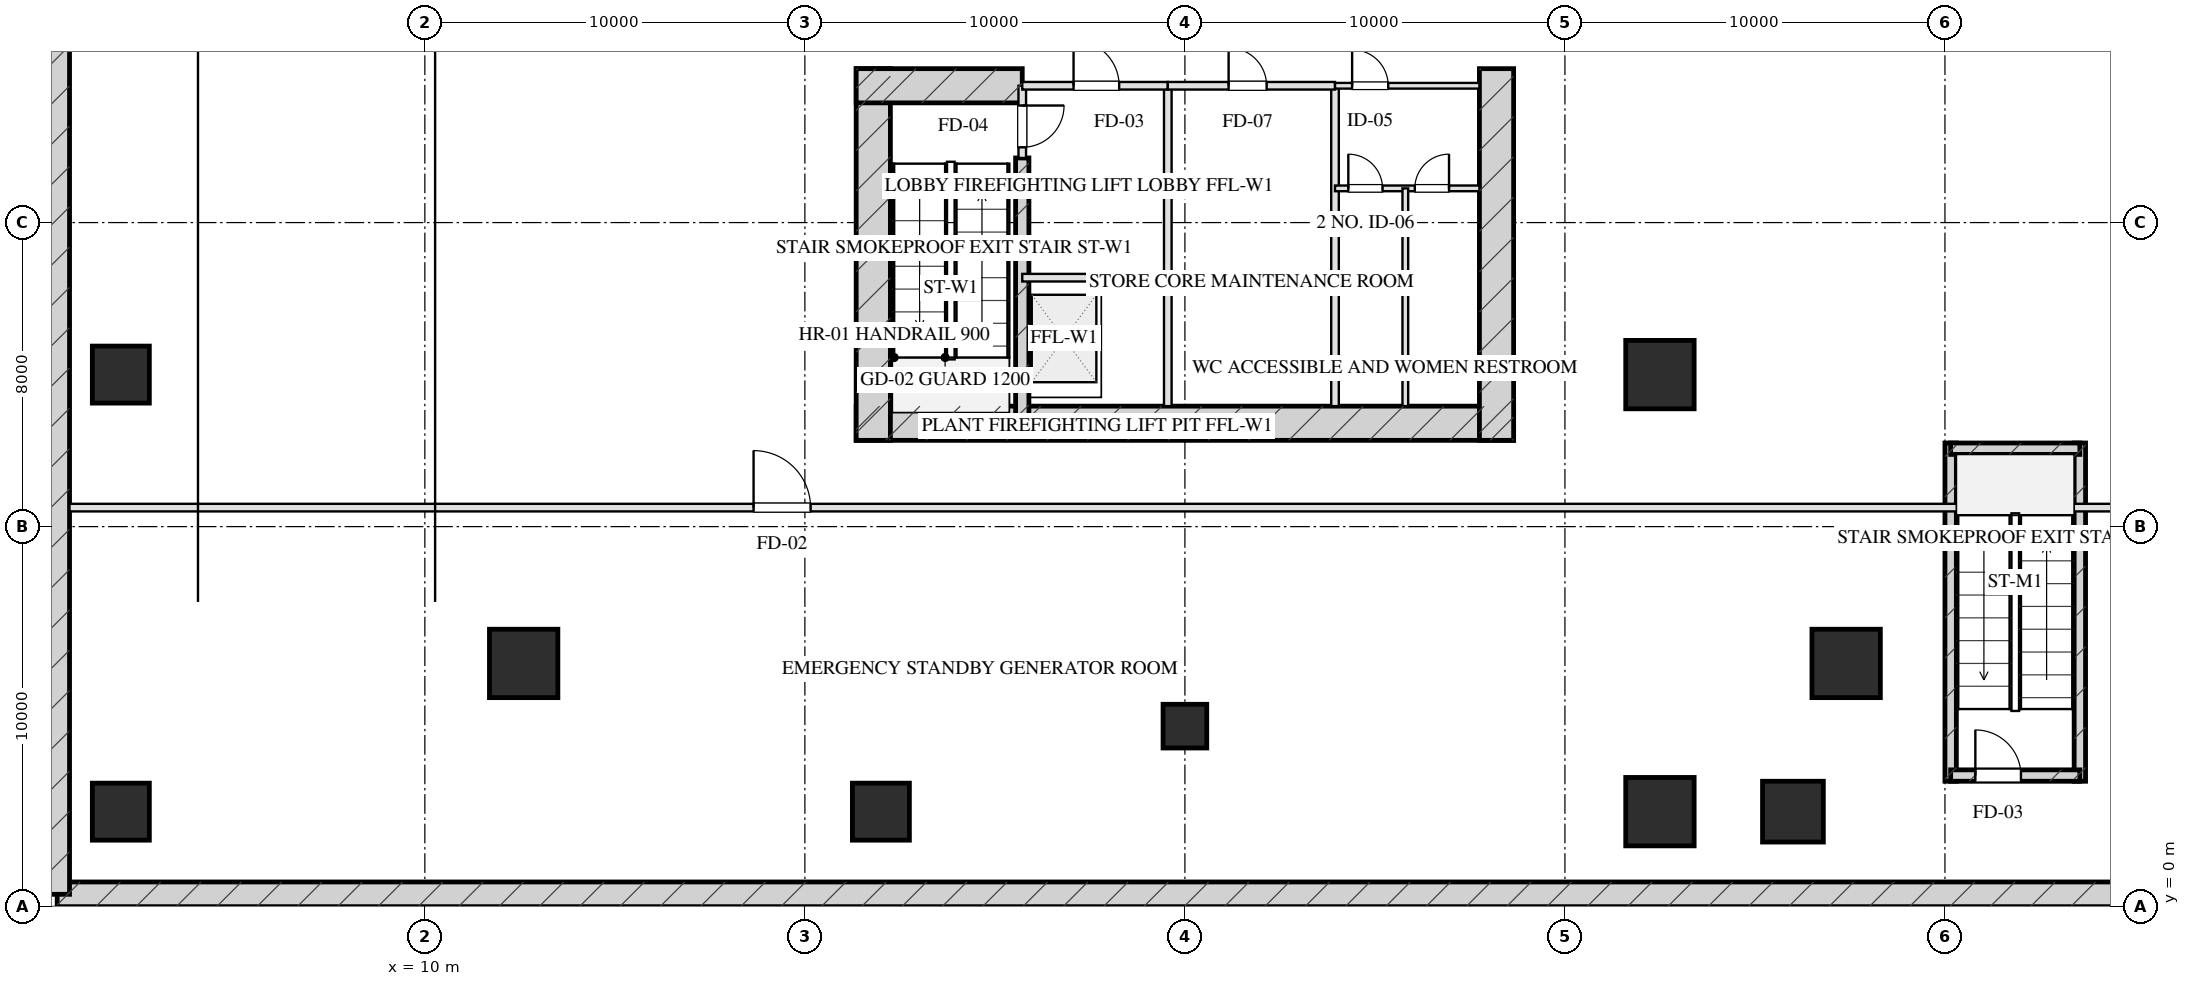
"""IFC4 building model, lengths in metres.
Left out: names, types, materials, properties, quantities, classifications, styles, units other than length and angle.
Written with IfcOpenShell. Run it as: python <this file> out.ifc"""

import sys

from ifc_helpers import new_model, si_unit, direction, frame, frame_2d, origin, origin_2d, place, context, subcontext, project, spatial, rectangle, hollow_rectangle, extrude, element, fill, save


model = new_model("IFC4")
c1 = context("Model", 3, precision=1e-05, world=origin(), true_north=direction((0.0, 1.0)))
c2 = subcontext(c1, "Body", "Model", "MODEL_VIEW")
j1 = project(units=[si_unit("LENGTHUNIT", "METRE"), si_unit("PLANEANGLEUNIT", "RADIAN")], contexts=[c1])
p1 = place(None, origin())
s1 = spatial("IfcSite", under=j1, at=p1, CompositionType="ELEMENT")
p2 = place(p1, origin())
s2 = spatial("IfcBuilding", under=s1, at=p2, CompositionType="ELEMENT")
p3 = place(p2, frame((0.0, 0.0, -12.0)))
s3 = spatial("IfcBuildingStorey", under=s2, at=p3, CompositionType="ELEMENT", Elevation=-12.0)
p4 = place(p3, frame((21.35, 12.72, 0.0), z_axis=(0.0, 0.0, 1.0), x_axis=(1.0, 0.0, 0.0)))
e1 = element("IfcWall", 1, at=p4, inside=s3, PredefinedType="SHEAR", context=c2, shape_type="SweptSolid", body=[
    extrude(rectangle(XDim=17.3, YDim=0.9, at=frame_2d((8.65, 0.0))), origin(), (0.0, 0.0, 1.0), 6.0),
])
for number, where, z_axis, x_axis in (
    (2, (21.8, 22.05, 0.0), (0.0, 0.0, 1.0), (0.0, -1.0, 0.0)),
    (3, (38.2, 22.05, 0.0), (0.0, 0.0, 1.0), (0.0, -1.0, 0.0)),
):
    element("IfcWall", number, at=place(p3, frame(where, z_axis=z_axis, x_axis=x_axis)), inside=s3, PredefinedType="SHEAR", context=c2, shape_type="SweptSolid", body=[
        extrude(rectangle(XDim=9.78, YDim=0.9, at=frame_2d((4.89, 0.0))), origin(), (0.0, 0.0, 1.0), 6.0),
    ])
p5 = place(p3, frame((25.72, 19.7, 0.0), z_axis=(0.0, 0.0, 1.0), x_axis=(0.0, -1.0, 0.0)))
e4 = element("IfcWall", 4, at=p5, inside=s3, PredefinedType="SHEAR", context=c2, shape_type="SweptSolid", body=[
    extrude(rectangle(XDim=6.98, YDim=0.35, at=frame_2d((3.49, 0.0))), origin(), (0.0, 0.0, 1.0), 6.0),
])
p6 = place(p3, frame((21.35, 21.6, 0.0), z_axis=(0.0, 0.0, 1.0), x_axis=(1.0, 0.0, 0.0)))
e5 = element("IfcWall", 5, at=p6, inside=s3, PredefinedType="SHEAR", context=c2, shape_type="SweptSolid", body=[
    extrude(rectangle(XDim=4.37, YDim=0.9, at=frame_2d((2.185, 0.0))), origin(), (0.0, 0.0, 1.0), 6.0),
])
for number, where, z_axis, x_axis in (
    (6, (50.15, 3.3, 0.0), (0.0, 0.0, 1.0), (0.0, 1.0, 0.0)),
    (7, (53.55, 3.3, 0.0), (0.0, 0.0, 1.0), (0.0, 1.0, 0.0)),
):
    element("IfcWall", number, at=place(p3, frame(where, z_axis=z_axis, x_axis=x_axis)), inside=s3, PredefinedType="SHEAR", context=c2, shape_type="SweptSolid", body=[
        extrude(rectangle(XDim=8.9, YDim=0.3, at=frame_2d((4.45, 0.0))), origin(), (0.0, 0.0, 1.0), 6.0),
    ])
p7 = place(p3, frame((50.15, 12.05, 0.0), z_axis=(0.0, 0.0, 1.0), x_axis=(1.0, 0.0, 0.0)))
e8 = element("IfcWall", 8, at=p7, inside=s3, PredefinedType="SHEAR", context=c2, shape_type="SweptSolid", body=[
    extrude(rectangle(XDim=3.4, YDim=0.3, at=frame_2d((1.7, 0.0))), origin(), (0.0, 0.0, 1.0), 6.0),
])
p8 = place(p3, frame((50.15, 3.45, 0.0), z_axis=(0.0, 0.0, 1.0), x_axis=(1.0, 0.0, 0.0)))
e9 = element("IfcWall", 9, at=p8, inside=s3, PredefinedType="SHEAR", context=c2, shape_type="SweptSolid", body=[
    extrude(rectangle(XDim=3.4, YDim=0.3, at=frame_2d((1.7, 0.0))), origin(), (0.0, 0.0, 1.0), 6.0),
])
p9 = place(p8, frame((0.65, 0.0, 0.0)))
e10 = element("IfcOpeningElement", 10, at=p9, cuts=e9, PredefinedType="OPENING", context=c2, shape_type="SweptSolid", body=[
    extrude(rectangle(XDim=1.2, YDim=2.05, at=frame_2d((0.6, 1.025))), frame((0.0, 0.16, 0.0), z_axis=(0.0, -1.0, 0.0), x_axis=(1.0, 0.0, 0.0)), (0.0, 0.0, 1.0), 0.32),
])
p10 = place(p3, frame((0.325, 0.325, 0.0), z_axis=(0.0, 0.0, 1.0), x_axis=(1.0, 0.0, 0.0)))
e11 = element("IfcWall", 11, at=p10, inside=s3, PredefinedType="SHEAR", context=c2, shape_type="SweptSolid", body=[
    extrude(rectangle(XDim=119.35, YDim=0.65, at=frame_2d((59.675, 0.0))), origin(), (0.0, 0.0, 1.0), 6.0),
])
p11 = place(p3, frame((0.325, 0.325, 0.0), z_axis=(0.0, 0.0, 1.0), x_axis=(0.0, 1.0, 0.0)))
e12 = element("IfcWall", 12, at=p11, inside=s3, PredefinedType="SHEAR", context=c2, shape_type="SweptSolid", body=[
    extrude(rectangle(XDim=67.35, YDim=0.65, at=frame_2d((33.675, 0.0))), origin(), (0.0, 0.0, 1.0), 6.0),
])
for number, where, z_axis, x_axis in (
    (13, (2.0, 2.5, 0.0), (0.0, 0.0, 1.0), (1.0, 0.0, 0.0)),
    (14, (2.0, 14.0, 0.0), (0.0, 0.0, 1.0), (1.0, 0.0, 0.0)),
    (15, (22.0, 2.5, 0.0), (0.0, 0.0, 1.0), (1.0, 0.0, 0.0)),
):
    element("IfcColumn", number, at=place(p3, frame(where, z_axis=z_axis, x_axis=x_axis)), inside=s3, PredefinedType="COLUMN", context=c2, shape_type="SweptSolid", body=[
        extrude(rectangle(XDim=1.5, YDim=1.5, at=origin_2d()), origin(), (0.0, 0.0, 1.0), 6.001),
    ])
for number, where, z_axis, x_axis in (
    (16, (42.5, 2.5, 0.0), (0.0, 0.0, 1.0), (1.0, 0.0, 0.0)),
    (17, (42.5, 14.0, 0.0), (0.0, 0.0, 1.0), (1.0, 0.0, 0.0)),
):
    element("IfcColumn", number, at=place(p3, frame(where, z_axis=z_axis, x_axis=x_axis)), inside=s3, PredefinedType="COLUMN", context=c2, shape_type="SweptSolid", body=[
        extrude(hollow_rectangle(XDim=1.8, YDim=1.8, WallThickness=0.06, at=origin_2d()), origin(), (0.0, 0.0, 1.0), 6.001),
    ])
p12 = place(p3, frame((46.0, 2.5, 0.0), z_axis=(0.0, 0.0, 1.0), x_axis=(1.0, 0.0, 0.0)))
e18 = element("IfcColumn", 18, at=p12, inside=s3, PredefinedType="COLUMN", context=c2, shape_type="SweptSolid", body=[
    extrude(hollow_rectangle(XDim=1.6, YDim=1.6, WallThickness=0.055, at=origin_2d()), origin(), (0.0, 0.0, 1.0), 6.001),
])
for number, where, z_axis, x_axis in (
    (19, (12.6, 6.4, 0.0), (0.0, 0.0, 1.0), (1.0, 0.0, 0.0)),
    (20, (47.4, 6.4, 0.0), (0.0, 0.0, 1.0), (1.0, 0.0, 0.0)),
):
    element("IfcColumn", number, at=place(p3, frame(where, z_axis=z_axis, x_axis=x_axis)), inside=s3, PredefinedType="COLUMN", context=c2, shape_type="SweptSolid", body=[
        extrude(hollow_rectangle(XDim=1.8, YDim=1.8, WallThickness=0.06, at=origin_2d()), origin(), (0.0, 0.0, 1.0), 6.001),
    ])
p13 = place(p3, frame((30.0, 4.75, 0.0), z_axis=(0.0, 0.0, 1.0), x_axis=(1.0, 0.0, 0.0)))
e21 = element("IfcColumn", 21, at=p13, inside=s3, PredefinedType="COLUMN", context=c2, shape_type="SweptSolid", body=[
    extrude(hollow_rectangle(XDim=1.15, YDim=1.15, WallThickness=0.04, at=origin_2d()), origin(), (0.0, 0.0, 1.0), 6.001),
])
p14 = place(p3, frame((25.72, 21.6, 0.0), z_axis=(0.0, 0.0, 1.0), x_axis=(0.0, -1.0, 0.0)))
e22 = element("IfcWall", 22, at=p14, inside=s3, PredefinedType="PARTITIONING", context=c2, shape_type="SweptSolid", body=[
    extrude(rectangle(XDim=1.9, YDim=0.2, at=frame_2d((0.95, 0.0))), origin(), (0.0, 0.0, 1.0), 5.635),
])
p15 = place(p14, frame((0.52, 0.0, 0.0)))
e23 = element("IfcOpeningElement", 23, at=p15, cuts=e22, PredefinedType="OPENING", context=c2, shape_type="SweptSolid", body=[
    extrude(rectangle(XDim=1.1, YDim=2.05, at=frame_2d((0.55, 1.025))), frame((0.0, 0.11, 0.0), z_axis=(0.0, -1.0, 0.0), x_axis=(1.0, 0.0, 0.0)), (0.0, 0.0, 1.0), 0.22),
])
p16 = place(p3, frame((29.55, 21.6, 0.0), z_axis=(0.0, 0.0, 1.0), x_axis=(0.0, -1.0, 0.0)))
e24 = element("IfcWall", 24, at=p16, inside=s3, PredefinedType="PARTITIONING", context=c2, shape_type="SweptSolid", body=[
    extrude(rectangle(XDim=8.43, YDim=0.2, at=frame_2d((4.215, 0.0))), origin(), (0.0, 0.0, 1.0), 5.635),
])
p17 = place(p3, frame((25.72, 21.6, 0.0), z_axis=(0.0, 0.0, 1.0), x_axis=(1.0, 0.0, 0.0)))
e25 = element("IfcWall", 25, at=p17, inside=s3, PredefinedType="PARTITIONING", context=c2, shape_type="SweptSolid", body=[
    extrude(rectangle(XDim=3.83, YDim=0.2, at=frame_2d((1.915, 0.0))), origin(), (0.0, 0.0, 1.0), 5.635),
])
p18 = place(p17, frame((1.35, 0.0, 0.0)))
e26 = element("IfcOpeningElement", 26, at=p18, cuts=e25, PredefinedType="OPENING", context=c2, shape_type="SweptSolid", body=[
    extrude(rectangle(XDim=1.2, YDim=2.05, at=frame_2d((0.6, 1.025))), frame((0.0, 0.11, 0.0), z_axis=(0.0, -1.0, 0.0), x_axis=(1.0, 0.0, 0.0)), (0.0, 0.0, 1.0), 0.22),
])
p19 = place(p3, frame((25.72, 16.55, 0.0), z_axis=(0.0, 0.0, 1.0), x_axis=(1.0, 0.0, 0.0)))
e27 = element("IfcWall", 27, at=p19, inside=s3, PredefinedType="PARTITIONING", context=c2, shape_type="SweptSolid", body=[
    extrude(rectangle(XDim=2.1, YDim=0.2, at=frame_2d((1.05, 0.0))), origin(), (0.0, 0.0, 1.0), 5.635),
])
p20 = place(p3, frame((27.82, 16.55, 0.0), z_axis=(0.0, 0.0, 1.0), x_axis=(1.0, 0.0, 0.0)))
e28 = element("IfcWall", 28, at=p20, inside=s3, PredefinedType="PARTITIONING", context=c2, shape_type="SweptSolid", body=[
    extrude(rectangle(XDim=1.73, YDim=0.2, at=frame_2d((0.865, 0.0))), origin(), (0.0, 0.0, 1.0), 5.635),
])
p21 = place(p3, frame((33.95, 21.6, 0.0), z_axis=(0.0, 0.0, 1.0), x_axis=(0.0, -1.0, 0.0)))
e29 = element("IfcWall", 29, at=p21, inside=s3, PredefinedType="PARTITIONING", context=c2, shape_type="SweptSolid", body=[
    extrude(rectangle(XDim=8.43, YDim=0.2, at=frame_2d((4.215, 0.0))), origin(), (0.0, 0.0, 1.0), 5.635),
])
p22 = place(p3, frame((29.55, 21.6, 0.0), z_axis=(0.0, 0.0, 1.0), x_axis=(1.0, 0.0, 0.0)))
e30 = element("IfcWall", 30, at=p22, inside=s3, PredefinedType="PARTITIONING", context=c2, shape_type="SweptSolid", body=[
    extrude(rectangle(XDim=4.4, YDim=0.2, at=frame_2d((2.2, 0.0))), origin(), (0.0, 0.0, 1.0), 5.635),
])
p23 = place(p22, frame((1.6, 0.0, 0.0)))
e31 = element("IfcOpeningElement", 31, at=p23, cuts=e30, PredefinedType="OPENING", context=c2, shape_type="SweptSolid", body=[
    extrude(rectangle(XDim=1.0, YDim=2.05, at=frame_2d((0.5, 1.025))), frame((0.0, 0.11, 0.0), z_axis=(0.0, -1.0, 0.0), x_axis=(1.0, 0.0, 0.0)), (0.0, 0.0, 1.0), 0.22),
])
p24 = place(p3, frame((33.95, 21.6, 0.0), z_axis=(0.0, 0.0, 1.0), x_axis=(1.0, 0.0, 0.0)))
e32 = element("IfcWall", 32, at=p24, inside=s3, PredefinedType="PARTITIONING", context=c2, shape_type="SweptSolid", body=[
    extrude(rectangle(XDim=3.8, YDim=0.15, at=frame_2d((1.9, 0.0))), origin(), (0.0, 0.0, 1.0), 5.635),
])
p25 = place(p24, frame((0.45, 0.0, 0.0)))
e33 = element("IfcOpeningElement", 33, at=p25, cuts=e32, PredefinedType="OPENING", context=c2, shape_type="SweptSolid", body=[
    extrude(rectangle(XDim=0.95, YDim=2.05, at=frame_2d((0.475, 1.025))), frame((0.0, 0.085, 0.0), z_axis=(0.0, -1.0, 0.0), x_axis=(1.0, 0.0, 0.0)), (0.0, 0.0, 1.0), 0.17),
])
p26 = place(p3, frame((33.95, 18.9, 0.0), z_axis=(0.0, 0.0, 1.0), x_axis=(1.0, 0.0, 0.0)))
e34 = element("IfcWall", 34, at=p26, inside=s3, PredefinedType="PARTITIONING", context=c2, shape_type="SweptSolid", body=[
    extrude(rectangle(XDim=3.8, YDim=0.15, at=frame_2d((1.9, 0.0))), origin(), (0.0, 0.0, 1.0), 5.635),
])
p27 = place(p26, frame((0.35, 0.0, 0.0)))
e35 = element("IfcOpeningElement", 35, at=p27, cuts=e34, PredefinedType="OPENING", context=c2, shape_type="SweptSolid", body=[
    extrude(rectangle(XDim=0.9, YDim=2.05, at=frame_2d((0.45, 1.025))), frame((0.0, 0.085, 0.0), z_axis=(0.0, -1.0, 0.0), x_axis=(1.0, 0.0, 0.0)), (0.0, 0.0, 1.0), 0.17),
])
p28 = place(p26, frame((2.1, 0.0, 0.0)))
e36 = element("IfcOpeningElement", 36, at=p28, cuts=e34, PredefinedType="OPENING", context=c2, shape_type="SweptSolid", body=[
    extrude(rectangle(XDim=0.9, YDim=2.05, at=frame_2d((0.45, 1.025))), frame((0.0, 0.085, 0.0), z_axis=(0.0, -1.0, 0.0), x_axis=(1.0, 0.0, 0.0)), (0.0, 0.0, 1.0), 0.17),
])
p29 = place(p3, frame((35.8, 18.9, 0.0), z_axis=(0.0, 0.0, 1.0), x_axis=(0.0, -1.0, 0.0)))
e37 = element("IfcWall", 37, at=p29, inside=s3, PredefinedType="PARTITIONING", context=c2, shape_type="SweptSolid", body=[
    extrude(rectangle(XDim=5.73, YDim=0.15, at=frame_2d((2.865, 0.0))), origin(), (0.0, 0.0, 1.0), 5.635),
])
p30 = place(p3, frame((0.65, 10.5, 0.0), z_axis=(0.0, 0.0, 1.0), x_axis=(1.0, 0.0, 0.0)))
e38 = element("IfcWall", 38, at=p30, inside=s3, PredefinedType="PARTITIONING", context=c2, shape_type="SweptSolid", body=[
    extrude(rectangle(XDim=118.7, YDim=0.2, at=frame_2d((59.35, 0.0))), origin(), (0.0, 0.0, 1.0), 5.635),
])
p31 = place(p30, frame((18.0, 0.0, 0.0)))
e39 = element("IfcOpeningElement", 39, at=p31, cuts=e38, PredefinedType="OPENING", context=c2, shape_type="SweptSolid", body=[
    extrude(rectangle(XDim=1.5, YDim=2.05, at=frame_2d((0.75, 1.025))), frame((0.0, 0.11, 0.0), z_axis=(0.0, -1.0, 0.0), x_axis=(1.0, 0.0, 0.0)), (0.0, 0.0, 1.0), 0.22),
])
p32 = place(p15, origin())
e40 = element("IfcDoor", 40, at=p32, inside=s3, OperationType="SINGLE_SWING_LEFT", PredefinedType="DOOR", context=c2, shape_type="SweptSolid", body=[
    extrude(rectangle(XDim=1.1, YDim=2.05, at=frame_2d((0.55, 1.025))), frame((0.0, 0.025, 0.0), z_axis=(0.0, -1.0, 0.0), x_axis=(1.0, 0.0, 0.0)), (0.0, 0.0, 1.0), 0.05),
])
fill(e23, e40)
p33 = place(p18, origin())
e41 = element("IfcDoor", 41, at=p33, inside=s3, OperationType="SINGLE_SWING_LEFT", PredefinedType="DOOR", context=c2, shape_type="SweptSolid", body=[
    extrude(rectangle(XDim=1.2, YDim=2.05, at=frame_2d((0.6, 1.025))), frame((0.0, 0.025, 0.0), z_axis=(0.0, -1.0, 0.0), x_axis=(1.0, 0.0, 0.0)), (0.0, 0.0, 1.0), 0.05),
])
fill(e26, e41)
p34 = place(p23, origin())
e42 = element("IfcDoor", 42, at=p34, inside=s3, OperationType="SINGLE_SWING_LEFT", PredefinedType="DOOR", context=c2, shape_type="SweptSolid", body=[
    extrude(rectangle(XDim=1.0, YDim=2.05, at=frame_2d((0.5, 1.025))), frame((0.0, 0.025, 0.0), z_axis=(0.0, -1.0, 0.0), x_axis=(1.0, 0.0, 0.0)), (0.0, 0.0, 1.0), 0.05),
])
fill(e31, e42)
p35 = place(p25, origin())
e43 = element("IfcDoor", 43, at=p35, inside=s3, OperationType="SINGLE_SWING_LEFT", PredefinedType="DOOR", context=c2, shape_type="SweptSolid", body=[
    extrude(rectangle(XDim=0.95, YDim=2.05, at=frame_2d((0.475, 1.025))), frame((0.0, 0.025, 0.0), z_axis=(0.0, -1.0, 0.0), x_axis=(1.0, 0.0, 0.0)), (0.0, 0.0, 1.0), 0.05),
])
fill(e33, e43)
p36 = place(p27, origin())
e44 = element("IfcDoor", 44, at=p36, inside=s3, OperationType="SINGLE_SWING_LEFT", PredefinedType="DOOR", context=c2, shape_type="SweptSolid", body=[
    extrude(rectangle(XDim=0.9, YDim=2.05, at=frame_2d((0.45, 1.025))), frame((0.0, 0.025, 0.0), z_axis=(0.0, -1.0, 0.0), x_axis=(1.0, 0.0, 0.0)), (0.0, 0.0, 1.0), 0.05),
])
fill(e35, e44)
p37 = place(p28, origin())
e45 = element("IfcDoor", 45, at=p37, inside=s3, OperationType="SINGLE_SWING_RIGHT", PredefinedType="DOOR", context=c2, shape_type="SweptSolid", body=[
    extrude(rectangle(XDim=0.9, YDim=2.05, at=frame_2d((0.45, 1.025))), frame((0.0, 0.025, 0.0), z_axis=(0.0, -1.0, 0.0), x_axis=(1.0, 0.0, 0.0)), (0.0, 0.0, 1.0), 0.05),
])
fill(e36, e45)
p38 = place(p31, origin())
e46 = element("IfcDoor", 46, at=p38, inside=s3, OperationType="SINGLE_SWING_LEFT", PredefinedType="DOOR", context=c2, shape_type="SweptSolid", body=[
    extrude(rectangle(XDim=1.5, YDim=2.05, at=frame_2d((0.75, 1.025))), frame((0.0, 0.025, 0.0), z_axis=(0.0, -1.0, 0.0), x_axis=(1.0, 0.0, 0.0)), (0.0, 0.0, 1.0), 0.05),
])
fill(e39, e46)
p39 = place(p9, origin())
e47 = element("IfcDoor", 47, at=p39, inside=s3, OperationType="SINGLE_SWING_LEFT", PredefinedType="DOOR", context=c2, shape_type="SweptSolid", body=[
    extrude(rectangle(XDim=1.2, YDim=2.05, at=frame_2d((0.6, 1.025))), frame((0.0, 0.025, 0.0), z_axis=(0.0, -1.0, 0.0), x_axis=(1.0, 0.0, 0.0)), (0.0, 0.0, 1.0), 0.05),
])
fill(e10, e47)
save(model, sys.argv[1])
